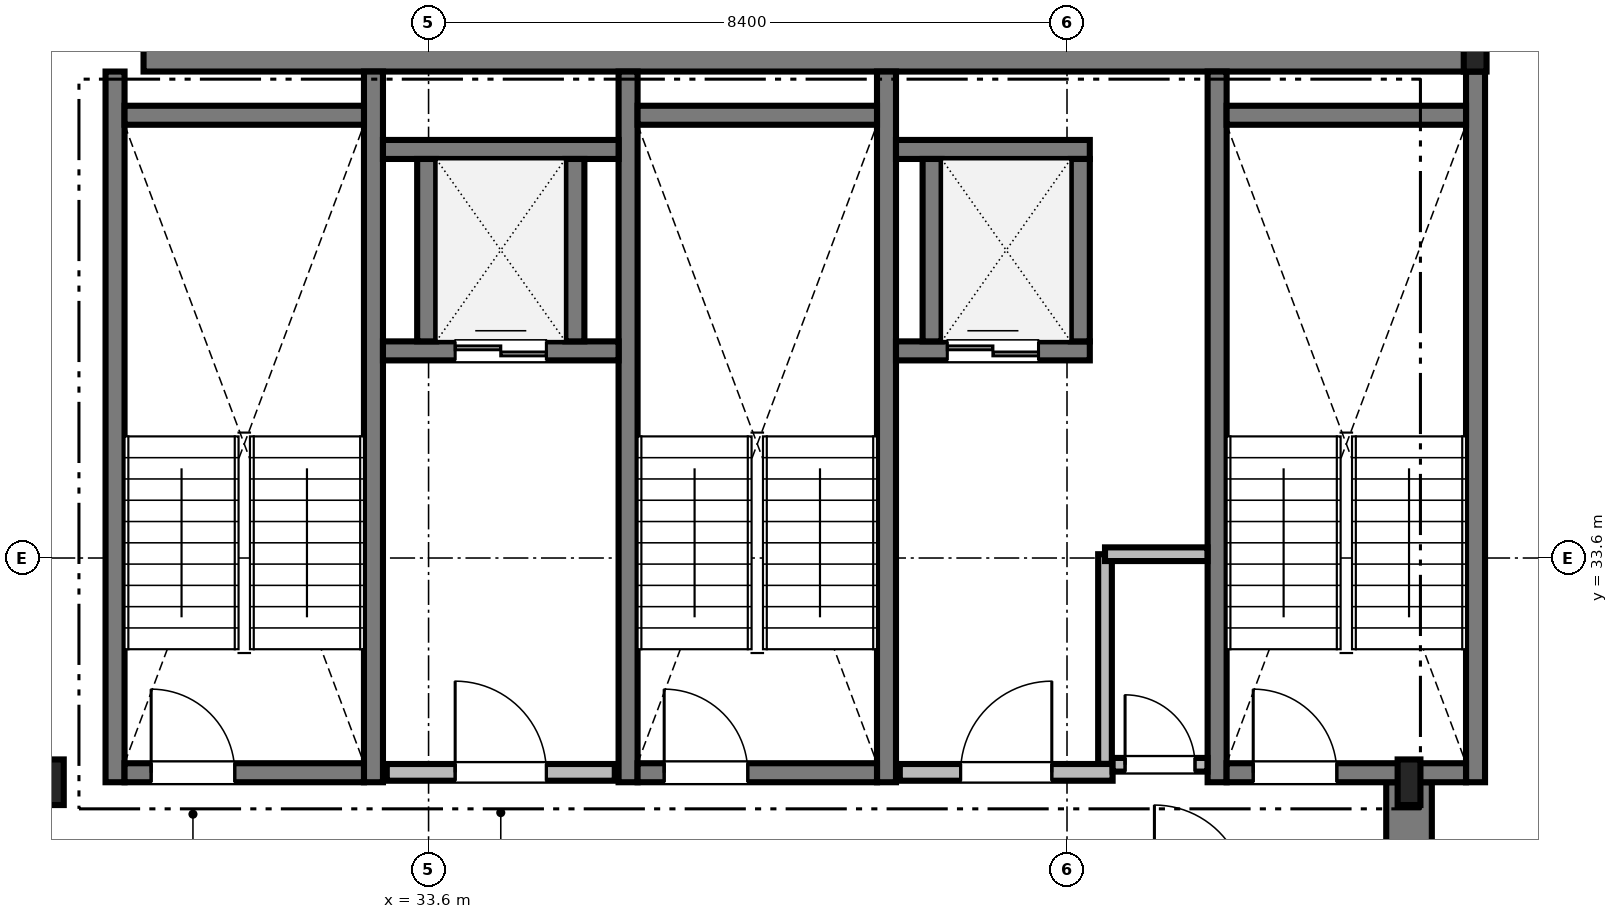
"""IFC4 building model, lengths in metres.
Left out: names, types, materials, properties, quantities, classifications, styles, units other than length and angle.
Written with IfcOpenShell. Run it as: python <this file> out.ifc"""

import sys

from ifc_helpers import new_model, si_unit, direction, frame, frame_2d, origin, origin_2d, place, context, subcontext, project, spatial, rectangle, i_section, extrude, source, transform, mapped, element, fill, save


model = new_model("IFC4")
c1 = context("Model", 3, precision=1e-05, world=origin(), true_north=direction((0.0, 1.0)))
c2 = subcontext(c1, "Body", "Model", "MODEL_VIEW")
j1 = project(units=[si_unit("LENGTHUNIT", "METRE"), si_unit("PLANEANGLEUNIT", "RADIAN")], contexts=[c1])
p1 = place(None, origin())
s1 = spatial("IfcSite", under=j1, at=p1, CompositionType="ELEMENT")
p2 = place(p1, origin())
s2 = spatial("IfcBuilding", under=s1, at=p2, CompositionType="ELEMENT")
p3 = place(p2, frame((0.0, 0.0, 282.2)))
s3 = spatial("IfcBuildingStorey", under=s2, at=p3, CompositionType="ELEMENT", Elevation=282.2)
m1 = source(origin(), c2, "Body", "SweptSolid", [
    extrude(rectangle(XDim=17.52, YDim=0.6, at=frame_2d((8.76, 0.0))), origin(), (0.0, 0.0, 1.0), 3.3),
])
p4 = place(p3, frame((29.85, 40.3, 0.0), z_axis=(0.0, 0.0, 1.0), x_axis=(1.0, 0.0, 0.0)))
e1 = element("IfcWall", 1, at=p4, inside=s3, PredefinedType="SHEAR", context=c2, shape_type="MappedRepresentation", body=[
    mapped(m1, transform((0.0, 0.0, 0.0), scale=1.0)),
])
m2 = source(origin(), c2, "Body", "SweptSolid", [
    extrude(rectangle(XDim=13.15, YDim=0.6, at=frame_2d((6.575, 0.0))), origin(), (0.0, 0.0, 1.0), 3.3),
])
p5 = place(p3, frame((46.5, 17.5, 0.0), z_axis=(0.0, 0.0, 1.0), x_axis=(0.0, 1.0, 0.0)))
e2 = element("IfcWall", 2, at=p5, inside=s3, PredefinedType="SHEAR", context=c2, shape_type="MappedRepresentation", body=[
    mapped(m2, transform((0.0, 0.0, 0.0), scale=1.0)),
])
m3 = source(origin(), c2, "Body", "SweptSolid", [
    extrude(i_section(OverallWidth=0.3, OverallDepth=0.6, WebThickness=0.015, FlangeThickness=0.03, FilletRadius=0.027, at=origin_2d()), origin(), (0.0, 0.0, 1.0), 3.3),
])
for number, where, z_axis, x_axis in (
    (3, (28.65, 30.65, 0.0), (0.0, 0.0, 1.0), (1.0, 0.0, 0.0)),
    (4, (46.5, 30.65, 0.0), (0.0, 0.0, 1.0), (1.0, 0.0, 0.0)),
    (5, (47.37, 40.3, 0.0), (0.0, 0.0, 1.0), (1.0, 0.0, 0.0)),
):
    element("IfcColumn", number, at=place(p3, frame(where, z_axis=z_axis, x_axis=x_axis)), inside=s3, PredefinedType="COLUMN", context=c2, shape_type="MappedRepresentation", body=[
        mapped(m3, transform((0.0, 0.0, 0.0), scale=1.0)),
    ])
m4 = source(origin(), c2, "Body", "SweptSolid", [
    extrude(rectangle(XDim=9.35, YDim=0.25, at=frame_2d((4.675, 0.0))), origin(), (0.0, 0.0, 1.0), 3.75),
])
for number, where, z_axis, x_axis in (
    (6, (29.475, 30.65, 0.0), (0.0, 0.0, 1.0), (0.0, 1.0, 0.0)),
    (7, (32.875, 30.65, 0.0), (0.0, 0.0, 1.0), (0.0, 1.0, 0.0)),
):
    element("IfcWall", number, at=place(p3, frame(where, z_axis=z_axis, x_axis=x_axis)), inside=s3, PredefinedType="SOLIDWALL", context=c2, shape_type="MappedRepresentation", body=[
        mapped(m4, transform((0.0, 0.0, 0.0), scale=1.0)),
    ])
m5 = source(origin(), c2, "Body", "SweptSolid", [
    extrude(rectangle(XDim=3.15, YDim=0.25, at=frame_2d((1.575, 0.0))), origin(), (0.0, 0.0, 1.0), 3.75),
])
p6 = place(p3, frame((29.6, 39.425, 0.0), z_axis=(0.0, 0.0, 1.0), x_axis=(1.0, 0.0, 0.0)))
e8 = element("IfcWall", 8, at=p6, inside=s3, PredefinedType="SOLIDWALL", context=c2, shape_type="MappedRepresentation", body=[
    mapped(m5, transform((0.0, 0.0, 0.0), scale=1.0)),
])
p7 = place(p3, frame((29.6, 30.775, 0.0), z_axis=(0.0, 0.0, 1.0), x_axis=(1.0, 0.0, 0.0)))
e9 = element("IfcWall", 9, at=p7, inside=s3, PredefinedType="SOLIDWALL", context=c2, shape_type="MappedRepresentation", body=[
    mapped(m5, transform((0.0, 0.0, 0.0), scale=1.0)),
])
m6 = source(origin(), c2, "Body", "SweptSolid", [
    extrude(rectangle(XDim=1.1, YDim=2.2, at=frame_2d((0.55, 1.1))), frame((0.0, 0.135, 0.0), z_axis=(0.0, -1.0, 0.0), x_axis=(1.0, 0.0, 0.0)), (0.0, 0.0, 1.0), 0.27),
])
p8 = place(p7, frame((0.35, 0.0, 0.0)))
e10 = element("IfcOpeningElement", 10, at=p8, cuts=e9, PredefinedType="OPENING", context=c2, shape_type="MappedRepresentation", body=[
    mapped(m6, transform((0.0, 0.0, 0.0), scale=1.0)),
])
for number, where, z_axis, x_axis in (
    (11, (36.225, 30.65, 0.0), (0.0, 0.0, 1.0), (0.0, 1.0, 0.0)),
    (12, (39.625, 30.65, 0.0), (0.0, 0.0, 1.0), (0.0, 1.0, 0.0)),
):
    element("IfcWall", number, at=place(p3, frame(where, z_axis=z_axis, x_axis=x_axis)), inside=s3, PredefinedType="SOLIDWALL", context=c2, shape_type="MappedRepresentation", body=[
        mapped(m4, transform((0.0, 0.0, 0.0), scale=1.0)),
    ])
p9 = place(p3, frame((36.35, 39.425, 0.0), z_axis=(0.0, 0.0, 1.0), x_axis=(1.0, 0.0, 0.0)))
e13 = element("IfcWall", 13, at=p9, inside=s3, PredefinedType="SOLIDWALL", context=c2, shape_type="MappedRepresentation", body=[
    mapped(m5, transform((0.0, 0.0, 0.0), scale=1.0)),
])
p10 = place(p3, frame((36.35, 30.775, 0.0), z_axis=(0.0, 0.0, 1.0), x_axis=(1.0, 0.0, 0.0)))
e14 = element("IfcWall", 14, at=p10, inside=s3, PredefinedType="SOLIDWALL", context=c2, shape_type="MappedRepresentation", body=[
    mapped(m5, transform((0.0, 0.0, 0.0), scale=1.0)),
])
p11 = place(p10, frame((0.35, 0.0, 0.0)))
e15 = element("IfcOpeningElement", 15, at=p11, cuts=e14, PredefinedType="OPENING", context=c2, shape_type="MappedRepresentation", body=[
    mapped(m6, transform((0.0, 0.0, 0.0), scale=1.0)),
])
for number, where, z_axis, x_axis in (
    (16, (43.975, 30.65, 0.0), (0.0, 0.0, 1.0), (0.0, 1.0, 0.0)),
    (17, (47.375, 30.65, 0.0), (0.0, 0.0, 1.0), (0.0, 1.0, 0.0)),
):
    element("IfcWall", number, at=place(p3, frame(where, z_axis=z_axis, x_axis=x_axis)), inside=s3, PredefinedType="SOLIDWALL", context=c2, shape_type="MappedRepresentation", body=[
        mapped(m4, transform((0.0, 0.0, 0.0), scale=1.0)),
    ])
p12 = place(p3, frame((44.1, 39.425, 0.0), z_axis=(0.0, 0.0, 1.0), x_axis=(1.0, 0.0, 0.0)))
e18 = element("IfcWall", 18, at=p12, inside=s3, PredefinedType="SOLIDWALL", context=c2, shape_type="MappedRepresentation", body=[
    mapped(m5, transform((0.0, 0.0, 0.0), scale=1.0)),
])
p13 = place(p3, frame((44.1, 30.775, 0.0), z_axis=(0.0, 0.0, 1.0), x_axis=(1.0, 0.0, 0.0)))
e19 = element("IfcWall", 19, at=p13, inside=s3, PredefinedType="SOLIDWALL", context=c2, shape_type="MappedRepresentation", body=[
    mapped(m5, transform((0.0, 0.0, 0.0), scale=1.0)),
])
p14 = place(p13, frame((0.35, 0.0, 0.0)))
e20 = element("IfcOpeningElement", 20, at=p14, cuts=e19, PredefinedType="OPENING", context=c2, shape_type="MappedRepresentation", body=[
    mapped(m6, transform((0.0, 0.0, 0.0), scale=1.0)),
])
m7 = source(origin(), c2, "Body", "SweptSolid", [
    extrude(rectangle(XDim=3.0, YDim=0.22, at=frame_2d((1.5, 0.0))), origin(), (0.0, 0.0, 1.0), 3.3),
])
p15 = place(p3, frame((33.05, 30.78, 0.0), z_axis=(0.0, 0.0, 1.0), x_axis=(1.0, 0.0, 0.0)))
e21 = element("IfcWall", 21, at=p15, inside=s3, PredefinedType="SOLIDWALL", context=c2, shape_type="MappedRepresentation", body=[
    mapped(m7, transform((0.0, 0.0, 0.0), scale=1.0)),
])
m8 = source(origin(), c2, "Body", "SweptSolid", [
    extrude(rectangle(XDim=1.2, YDim=2.2, at=frame_2d((0.6, 1.1))), frame((0.0, 0.12, 0.0), z_axis=(0.0, -1.0, 0.0), x_axis=(1.0, 0.0, 0.0)), (0.0, 0.0, 1.0), 0.24),
])
p16 = place(p15, frame((0.9, 0.0, 0.0)))
e22 = element("IfcOpeningElement", 22, at=p16, cuts=e21, PredefinedType="OPENING", context=c2, shape_type="MappedRepresentation", body=[
    mapped(m8, transform((0.0, 0.0, 0.0), scale=1.0)),
])
m9 = source(origin(), c2, "Body", "SweptSolid", [
    extrude(rectangle(XDim=2.8, YDim=0.22, at=frame_2d((1.4, 0.0))), origin(), (0.0, 0.0, 1.0), 3.3),
])
p17 = place(p3, frame((39.8, 30.78, 0.0), z_axis=(0.0, 0.0, 1.0), x_axis=(1.0, 0.0, 0.0)))
e23 = element("IfcWall", 23, at=p17, inside=s3, PredefinedType="SOLIDWALL", context=c2, shape_type="MappedRepresentation", body=[
    mapped(m9, transform((0.0, 0.0, 0.0), scale=1.0)),
])
p18 = place(p17, frame((0.8, 0.0, 0.0)))
e24 = element("IfcOpeningElement", 24, at=p18, cuts=e23, PredefinedType="OPENING", context=c2, shape_type="MappedRepresentation", body=[
    mapped(m8, transform((0.0, 0.0, 0.0), scale=1.0)),
])
m10 = source(origin(), c2, "Body", "SweptSolid", [
    extrude(rectangle(XDim=3.1, YDim=0.25, at=frame_2d((1.55, 0.0))), origin(), (0.0, 0.0, 1.0), 3.3),
])
p19 = place(p3, frame((33.0, 36.325, 0.0), z_axis=(0.0, 0.0, 1.0), x_axis=(1.0, 0.0, 0.0)))
e25 = element("IfcWall", 25, at=p19, inside=s3, PredefinedType="SOLIDWALL", context=c2, shape_type="MappedRepresentation", body=[
    mapped(m10, transform((0.0, 0.0, 0.0), scale=1.0)),
])
m11 = source(origin(), c2, "Body", "SweptSolid", [
    extrude(rectangle(XDim=1.2, YDim=2.25, at=frame_2d((0.6, 1.125))), frame((0.0, 0.135, 0.0), z_axis=(0.0, -1.0, 0.0), x_axis=(1.0, 0.0, 0.0)), (0.0, 0.0, 1.0), 0.27),
])
p20 = place(p19, frame((0.95, 0.0, 0.0)))
e26 = element("IfcOpeningElement", 26, at=p20, cuts=e25, PredefinedType="OPENING", context=c2, shape_type="MappedRepresentation", body=[
    mapped(m11, transform((0.0, 0.0, 0.0), scale=1.0)),
])
p21 = place(p3, frame((33.0, 38.975, 0.0), z_axis=(0.0, 0.0, 1.0), x_axis=(1.0, 0.0, 0.0)))
e27 = element("IfcWall", 27, at=p21, inside=s3, PredefinedType="SOLIDWALL", context=c2, shape_type="MappedRepresentation", body=[
    mapped(m10, transform((0.0, 0.0, 0.0), scale=1.0)),
])
m12 = source(origin(), c2, "Body", "SweptSolid", [
    extrude(rectangle(XDim=2.4, YDim=0.25, at=frame_2d((1.2, 0.0))), origin(), (0.0, 0.0, 1.0), 3.3),
])
for number, where, z_axis, x_axis in (
    (28, (33.575, 36.45, 0.0), (0.0, 0.0, 1.0), (0.0, 1.0, 0.0)),
    (29, (35.525, 36.45, 0.0), (0.0, 0.0, 1.0), (0.0, 1.0, 0.0)),
):
    element("IfcWall", number, at=place(p3, frame(where, z_axis=z_axis, x_axis=x_axis)), inside=s3, PredefinedType="SOLIDWALL", context=c2, shape_type="MappedRepresentation", body=[
        mapped(m12, transform((0.0, 0.0, 0.0), scale=1.0)),
    ])
m13 = source(origin(), c2, "Body", "SweptSolid", [
    extrude(rectangle(XDim=2.55, YDim=0.25, at=frame_2d((1.275, 0.0))), origin(), (0.0, 0.0, 1.0), 3.3),
])
p22 = place(p3, frame((39.75, 36.325, 0.0), z_axis=(0.0, 0.0, 1.0), x_axis=(1.0, 0.0, 0.0)))
e30 = element("IfcWall", 30, at=p22, inside=s3, PredefinedType="SOLIDWALL", context=c2, shape_type="MappedRepresentation", body=[
    mapped(m13, transform((0.0, 0.0, 0.0), scale=1.0)),
])
p23 = place(p22, frame((0.675, 0.0, 0.0)))
e31 = element("IfcOpeningElement", 31, at=p23, cuts=e30, PredefinedType="OPENING", context=c2, shape_type="MappedRepresentation", body=[
    mapped(m11, transform((0.0, 0.0, 0.0), scale=1.0)),
])
p24 = place(p3, frame((39.75, 38.975, 0.0), z_axis=(0.0, 0.0, 1.0), x_axis=(1.0, 0.0, 0.0)))
e32 = element("IfcWall", 32, at=p24, inside=s3, PredefinedType="SOLIDWALL", context=c2, shape_type="MappedRepresentation", body=[
    mapped(m13, transform((0.0, 0.0, 0.0), scale=1.0)),
])
for number, where, z_axis, x_axis in (
    (33, (40.225, 36.45, 0.0), (0.0, 0.0, 1.0), (0.0, 1.0, 0.0)),
    (34, (42.175, 36.45, 0.0), (0.0, 0.0, 1.0), (0.0, 1.0, 0.0)),
):
    element("IfcWall", number, at=place(p3, frame(where, z_axis=z_axis, x_axis=x_axis)), inside=s3, PredefinedType="SOLIDWALL", context=c2, shape_type="MappedRepresentation", body=[
        mapped(m12, transform((0.0, 0.0, 0.0), scale=1.0)),
    ])
m14 = source(origin(), c2, "Body", "SweptSolid", [
    extrude(rectangle(XDim=1.248, YDim=0.18, at=frame_2d((0.624, 0.0))), origin(), (0.0, 0.0, 1.0), 3.3),
])
p25 = place(p3, frame((42.6, 30.88, 0.0), z_axis=(0.0, 0.0, 1.0), x_axis=(1.0, 0.0, 0.0)))
e35 = element("IfcWall", 35, at=p25, inside=s3, PredefinedType="PARTITIONING", context=c2, shape_type="MappedRepresentation", body=[
    mapped(m14, transform((0.0, 0.0, 0.0), scale=1.0)),
])
m15 = source(origin(), c2, "Body", "SweptSolid", [
    extrude(rectangle(XDim=0.92, YDim=2.1, at=frame_2d((0.46, 1.05))), frame((0.0, 0.1, 0.0), z_axis=(0.0, -1.0, 0.0), x_axis=(1.0, 0.0, 0.0)), (0.0, 0.0, 1.0), 0.2),
])
p26 = place(p25, frame((0.164, 0.0, 0.0)))
e36 = element("IfcOpeningElement", 36, at=p26, cuts=e35, PredefinedType="OPENING", context=c2, shape_type="MappedRepresentation", body=[
    mapped(m15, transform((0.0, 0.0, 0.0), scale=1.0)),
])
m16 = source(origin(), c2, "Body", "SweptSolid", [
    extrude(rectangle(XDim=2.758, YDim=0.18, at=frame_2d((1.379, 0.0))), origin(), (0.0, 0.0, 1.0), 3.3),
])
p27 = place(p3, frame((42.5, 30.892, 0.0), z_axis=(0.0, 0.0, 1.0), x_axis=(0.0, 1.0, 0.0)))
e37 = element("IfcWall", 37, at=p27, inside=s3, PredefinedType="PARTITIONING", context=c2, shape_type="MappedRepresentation", body=[
    mapped(m16, transform((0.0, 0.0, 0.0), scale=1.0)),
])
m17 = source(origin(), c2, "Body", "SweptSolid", [
    extrude(rectangle(XDim=1.348, YDim=0.18, at=frame_2d((0.674, 0.0))), origin(), (0.0, 0.0, 1.0), 3.3),
])
p28 = place(p3, frame((42.5, 33.65, 0.0), z_axis=(0.0, 0.0, 1.0), x_axis=(1.0, 0.0, 0.0)))
e38 = element("IfcWall", 38, at=p28, inside=s3, PredefinedType="PARTITIONING", context=c2, shape_type="MappedRepresentation", body=[
    mapped(m17, transform((0.0, 0.0, 0.0), scale=1.0)),
])
m18 = source(origin(), c2, "Body", "SweptSolid", [
    extrude(rectangle(XDim=1.1, YDim=2.2, at=frame_2d((0.55, 1.1))), frame((0.0, 0.025, 0.0), z_axis=(0.0, -1.0, 0.0), x_axis=(1.0, 0.0, 0.0)), (0.0, 0.0, 1.0), 0.05),
])
p29 = place(p8, origin())
e39 = element("IfcDoor", 39, at=p29, inside=s3, OperationType="SINGLE_SWING_LEFT", PredefinedType="DOOR", context=c2, shape_type="MappedRepresentation", body=[
    mapped(m18, transform((0.0, 0.0, 0.0), scale=1.0)),
])
fill(e10, e39)
p30 = place(p11, origin())
e40 = element("IfcDoor", 40, at=p30, inside=s3, OperationType="SINGLE_SWING_LEFT", PredefinedType="DOOR", context=c2, shape_type="MappedRepresentation", body=[
    mapped(m18, transform((0.0, 0.0, 0.0), scale=1.0)),
])
fill(e15, e40)
p31 = place(p14, origin())
e41 = element("IfcDoor", 41, at=p31, inside=s3, OperationType="SINGLE_SWING_LEFT", PredefinedType="DOOR", context=c2, shape_type="MappedRepresentation", body=[
    mapped(m18, transform((0.0, 0.0, 0.0), scale=1.0)),
])
fill(e20, e41)
m19 = source(origin(), c2, "Body", "SweptSolid", [
    extrude(rectangle(XDim=1.2, YDim=2.2, at=frame_2d((0.6, 1.1))), frame((0.0, 0.025, 0.0), z_axis=(0.0, -1.0, 0.0), x_axis=(1.0, 0.0, 0.0)), (0.0, 0.0, 1.0), 0.05),
])
p32 = place(p16, origin())
e42 = element("IfcDoor", 42, at=p32, inside=s3, OperationType="SINGLE_SWING_LEFT", PredefinedType="DOOR", context=c2, shape_type="MappedRepresentation", body=[
    mapped(m19, transform((0.0, 0.0, 0.0), scale=1.0)),
])
fill(e22, e42)
p33 = place(p18, origin())
e43 = element("IfcDoor", 43, at=p33, inside=s3, OperationType="SINGLE_SWING_RIGHT", PredefinedType="DOOR", context=c2, shape_type="MappedRepresentation", body=[
    mapped(m19, transform((0.0, 0.0, 0.0), scale=1.0)),
])
fill(e24, e43)
m20 = source(origin(), c2, "Body", "SweptSolid", [
    extrude(rectangle(XDim=1.2, YDim=2.25, at=frame_2d((0.6, 1.125))), frame((0.0, 0.025, 0.0), z_axis=(0.0, -1.0, 0.0), x_axis=(1.0, 0.0, 0.0)), (0.0, 0.0, 1.0), 0.05),
])
p34 = place(p20, origin())
e44 = element("IfcDoor", 44, at=p34, inside=s3, OperationType="DOUBLE_DOOR_SLIDING", PredefinedType="DOOR", context=c2, shape_type="MappedRepresentation", body=[
    mapped(m20, transform((0.0, 0.0, 0.0), scale=1.0)),
])
fill(e26, e44)
p35 = place(p23, origin())
e45 = element("IfcDoor", 45, at=p35, inside=s3, OperationType="DOUBLE_DOOR_SLIDING", PredefinedType="DOOR", context=c2, shape_type="MappedRepresentation", body=[
    mapped(m20, transform((0.0, 0.0, 0.0), scale=1.0)),
])
fill(e31, e45)
m21 = source(origin(), c2, "Body", "SweptSolid", [
    extrude(rectangle(XDim=0.92, YDim=2.1, at=frame_2d((0.46, 1.05))), frame((0.0, 0.025, 0.0), z_axis=(0.0, -1.0, 0.0), x_axis=(1.0, 0.0, 0.0)), (0.0, 0.0, 1.0), 0.05),
])
p36 = place(p26, origin())
e46 = element("IfcDoor", 46, at=p36, inside=s3, OperationType="SINGLE_SWING_LEFT", PredefinedType="DOOR", context=c2, shape_type="MappedRepresentation", body=[
    mapped(m21, transform((0.0, 0.0, 0.0), scale=1.0)),
])
fill(e36, e46)
save(model, sys.argv[1])
